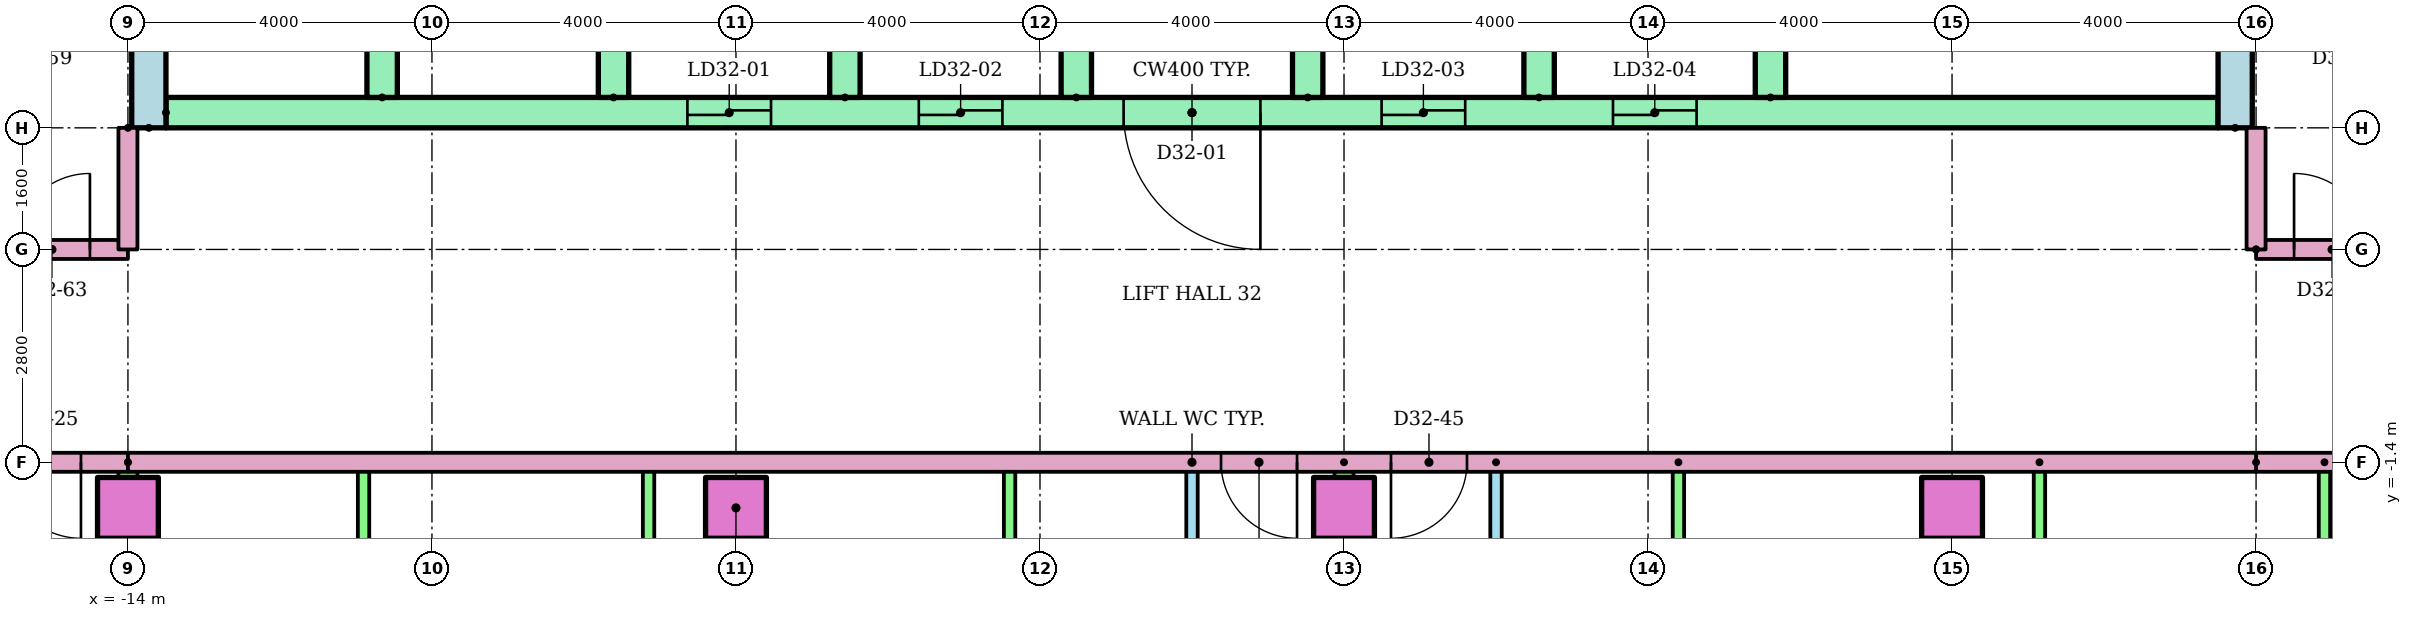
"""IFC4 building model, lengths in metres.
Left out: names, types, materials, properties, quantities, classifications, styles, units other than length and angle.
Written with IfcOpenShell. Run it as: python <this file> out.ifc"""

import sys

from ifc_helpers import new_model, si_unit, direction, frame, frame_2d, origin, origin_2d, place, context, subcontext, project, spatial, rectangle, extrude, element, fill, save


model = new_model("IFC4")
c1 = context("Model", 3, precision=1e-05, world=origin(), true_north=direction((0.0, 1.0)))
c2 = subcontext(c1, "Body", "Model", "MODEL_VIEW")
j1 = project(units=[si_unit("LENGTHUNIT", "METRE"), si_unit("PLANEANGLEUNIT", "RADIAN")], contexts=[c1])
p1 = place(None, origin())
s1 = spatial("IfcSite", under=j1, at=p1, CompositionType="ELEMENT")
p2 = place(p1, origin())
s2 = spatial("IfcBuilding", under=s1, at=p2, CompositionType="ELEMENT")
p3 = place(p2, frame((0.0, 0.0, 126.2)))
s3 = spatial("IfcBuildingStorey", under=s2, at=p3, CompositionType="ELEMENT", Elevation=126.2)
for number, where in (
    (1, (-14.0, -2.0, 0.0)),
    (2, (-6.0, -2.0, 0.0)),
    (3, (2.0, -2.0, 0.0)),
    (4, (10.0, -2.0, 0.0)),
):
    element("IfcColumn", number, at=place(p3, frame(where)), inside=s3, PredefinedType="COLUMN", context=c2, shape_type="SweptSolid", body=[
        extrude(rectangle(XDim=0.8, YDim=0.8, at=origin_2d()), origin(), (0.0, 0.0, 1.0), 3.2),
    ])
for number, where, z_axis, x_axis in (
    (5, (-13.725, 3.0, 0.0), (0.0, 0.0, 1.0), (0.0, 1.0, 0.0)),
    (6, (13.725, 3.0, 0.0), (0.0, 0.0, 1.0), (0.0, 1.0, 0.0)),
):
    element("IfcWall", number, at=place(p3, frame(where, z_axis=z_axis, x_axis=x_axis)), inside=s3, PredefinedType="SHEAR", context=c2, shape_type="SweptSolid", body=[
        extrude(rectangle(XDim=17.0, YDim=0.45, at=frame_2d((8.5, 0.0))), origin(), (0.0, 0.0, 1.0), 2.92),
    ])
p4 = place(p3, frame((-13.5, 3.2, 0.0)))
e7 = element("IfcWall", 7, at=p4, inside=s3, PredefinedType="SHEAR", context=c2, shape_type="SweptSolid", body=[
    extrude(rectangle(XDim=27.0, YDim=0.4, at=frame_2d((13.5, 0.0))), origin(), (0.0, 0.0, 1.0), 2.92),
])
p5 = place(p4, frame((6.861, 0.0, 0.0)))
e8 = element("IfcOpeningElement", 8, at=p5, cuts=e7, PredefinedType="OPENING", context=c2, shape_type="SweptSolid", body=[
    extrude(rectangle(XDim=1.1, YDim=2.1, at=frame_2d((0.55, 1.05))), frame((0.0, 0.21, 0.0), z_axis=(0.0, -1.0, 0.0), x_axis=(1.0, 0.0, 0.0)), (0.0, 0.0, 1.0), 0.42),
])
p6 = place(p4, frame((9.906, 0.0, 0.0)))
e9 = element("IfcOpeningElement", 9, at=p6, cuts=e7, PredefinedType="OPENING", context=c2, shape_type="SweptSolid", body=[
    extrude(rectangle(XDim=1.1, YDim=2.1, at=frame_2d((0.55, 1.05))), frame((0.0, 0.21, 0.0), z_axis=(0.0, -1.0, 0.0), x_axis=(1.0, 0.0, 0.0)), (0.0, 0.0, 1.0), 0.42),
])
p7 = place(p4, frame((15.994, 0.0, 0.0)))
e10 = element("IfcOpeningElement", 10, at=p7, cuts=e7, PredefinedType="OPENING", context=c2, shape_type="SweptSolid", body=[
    extrude(rectangle(XDim=1.1, YDim=2.1, at=frame_2d((0.55, 1.05))), frame((0.0, 0.21, 0.0), z_axis=(0.0, -1.0, 0.0), x_axis=(1.0, 0.0, 0.0)), (0.0, 0.0, 1.0), 0.42),
])
p8 = place(p4, frame((19.039, 0.0, 0.0)))
e11 = element("IfcOpeningElement", 11, at=p8, cuts=e7, PredefinedType="OPENING", context=c2, shape_type="SweptSolid", body=[
    extrude(rectangle(XDim=1.1, YDim=2.1, at=frame_2d((0.55, 1.05))), frame((0.0, 0.21, 0.0), z_axis=(0.0, -1.0, 0.0), x_axis=(1.0, 0.0, 0.0)), (0.0, 0.0, 1.0), 0.42),
])
p9 = place(p4, frame((12.6, 0.0, 0.0)))
e12 = element("IfcOpeningElement", 12, at=p9, cuts=e7, PredefinedType="OPENING", context=c2, shape_type="SweptSolid", body=[
    extrude(rectangle(XDim=1.8, YDim=2.1, at=frame_2d((0.9, 1.05))), frame((0.0, 0.21, 0.0), z_axis=(0.0, -1.0, 0.0), x_axis=(1.0, 0.0, 0.0)), (0.0, 0.0, 1.0), 0.42),
])
for number, where, z_axis, x_axis in (
    (13, (-10.656, 3.4, 0.0), (0.0, 0.0, 1.0), (0.0, 1.0, 0.0)),
    (14, (-7.611, 3.4, 0.0), (0.0, 0.0, 1.0), (0.0, 1.0, 0.0)),
    (15, (-4.567, 3.4, 0.0), (0.0, 0.0, 1.0), (0.0, 1.0, 0.0)),
    (16, (-1.522, 3.4, 0.0), (0.0, 0.0, 1.0), (0.0, 1.0, 0.0)),
    (17, (1.522, 3.4, 0.0), (0.0, 0.0, 1.0), (0.0, 1.0, 0.0)),
    (18, (4.567, 3.4, 0.0), (0.0, 0.0, 1.0), (0.0, 1.0, 0.0)),
    (19, (7.611, 3.4, 0.0), (0.0, 0.0, 1.0), (0.0, 1.0, 0.0)),
):
    element("IfcWall", number, at=place(p3, frame(where, z_axis=z_axis, x_axis=x_axis)), inside=s3, PredefinedType="SHEAR", context=c2, shape_type="SweptSolid", body=[
        extrude(rectangle(XDim=3.0, YDim=0.4, at=frame_2d((1.5, 0.0))), origin(), (0.0, 0.0, 1.0), 2.92),
    ])
p10 = place(p3, frame((0.0, -8.0, 0.0), z_axis=(0.0, 0.0, 1.0), x_axis=(0.0, 1.0, 0.0)))
e20 = element("IfcWall", 20, at=p10, inside=s3, PredefinedType="PARTITIONING", context=c2, shape_type="SweptSolid", body=[
    extrude(rectangle(XDim=6.6, YDim=0.15, at=frame_2d((3.3, 0.0))), origin(), (0.0, 0.0, 1.0), 2.4),
])
p11 = place(p10, frame((4.275, 0.0, 0.0)))
e21 = element("IfcOpeningElement", 21, at=p11, cuts=e20, PredefinedType="OPENING", context=c2, shape_type="SweptSolid", body=[
    extrude(rectangle(XDim=0.9, YDim=2.1, at=frame_2d((0.45, 1.05))), frame((0.0, 0.085, 0.0), z_axis=(0.0, -1.0, 0.0), x_axis=(1.0, 0.0, 0.0)), (0.0, 0.0, 1.0), 0.17),
])
p12 = place(p10, frame((1.025, 0.0, 0.0)))
e22 = element("IfcOpeningElement", 22, at=p12, cuts=e20, PredefinedType="OPENING", context=c2, shape_type="SweptSolid", body=[
    extrude(rectangle(XDim=0.8, YDim=2.1, at=frame_2d((0.4, 1.05))), frame((0.0, 0.085, 0.0), z_axis=(0.0, -1.0, 0.0), x_axis=(1.0, 0.0, 0.0)), (0.0, 0.0, 1.0), 0.17),
])
for number, where, z_axis, x_axis in (
    (23, (-2.4, -8.0, 0.0), (0.0, 0.0, 1.0), (0.0, 1.0, 0.0)),
    (24, (-7.15, -8.0, 0.0), (0.0, 0.0, 1.0), (0.0, 1.0, 0.0)),
    (25, (-10.9, -8.0, 0.0), (0.0, 0.0, 1.0), (0.0, 1.0, 0.0)),
):
    element("IfcWall", number, at=place(p3, frame(where, z_axis=z_axis, x_axis=x_axis)), inside=s3, PredefinedType="PARTITIONING", context=c2, shape_type="SweptSolid", body=[
        extrude(rectangle(XDim=6.6, YDim=0.15, at=frame_2d((3.3, 0.0))), origin(), (0.0, 0.0, 1.0), 2.4),
    ])
p13 = place(p3, frame((-14.0, -1.4, 0.0), z_axis=(0.0, 0.0, 1.0), x_axis=(0.0, -1.0, 0.0)))
e26 = element("IfcWall", 26, at=p13, inside=s3, PredefinedType="PARTITIONING", context=c2, shape_type="SweptSolid", body=[
    extrude(rectangle(XDim=14.91, YDim=0.25, at=frame_2d((7.455, 0.0))), origin(), (0.0, 0.0, 1.0), 2.4),
])
p14 = place(p3, frame((4.0, -1.4, 0.0), z_axis=(0.0, 0.0, 1.0), x_axis=(0.0, -1.0, 0.0)))
e27 = element("IfcWall", 27, at=p14, inside=s3, PredefinedType="PARTITIONING", context=c2, shape_type="SweptSolid", body=[
    extrude(rectangle(XDim=6.6, YDim=0.15, at=frame_2d((3.3, 0.0))), origin(), (0.0, 0.0, 1.0), 2.4),
])
p15 = place(p14, frame((1.425, 0.0, 0.0)))
e28 = element("IfcOpeningElement", 28, at=p15, cuts=e27, PredefinedType="OPENING", context=c2, shape_type="SweptSolid", body=[
    extrude(rectangle(XDim=0.9, YDim=2.1, at=frame_2d((0.45, 1.05))), frame((0.0, 0.085, 0.0), z_axis=(0.0, -1.0, 0.0), x_axis=(1.0, 0.0, 0.0)), (0.0, 0.0, 1.0), 0.17),
])
p16 = place(p14, frame((4.775, 0.0, 0.0)))
e29 = element("IfcOpeningElement", 29, at=p16, cuts=e27, PredefinedType="OPENING", context=c2, shape_type="SweptSolid", body=[
    extrude(rectangle(XDim=0.8, YDim=2.1, at=frame_2d((0.4, 1.05))), frame((0.0, 0.085, 0.0), z_axis=(0.0, -1.0, 0.0), x_axis=(1.0, 0.0, 0.0)), (0.0, 0.0, 1.0), 0.17),
])
for number, where, z_axis, x_axis in (
    (30, (6.4, -1.4, 0.0), (0.0, 0.0, 1.0), (0.0, -1.0, 0.0)),
    (31, (11.15, -1.4, 0.0), (0.0, 0.0, 1.0), (0.0, -1.0, 0.0)),
    (32, (14.9, -1.4, 0.0), (0.0, 0.0, 1.0), (0.0, -1.0, 0.0)),
):
    element("IfcWall", number, at=place(p3, frame(where, z_axis=z_axis, x_axis=x_axis)), inside=s3, PredefinedType="PARTITIONING", context=c2, shape_type="SweptSolid", body=[
        extrude(rectangle(XDim=6.6, YDim=0.15, at=frame_2d((3.3, 0.0))), origin(), (0.0, 0.0, 1.0), 2.4),
    ])
p17 = place(p3, frame((2.0, -1.4, 0.0), z_axis=(0.0, 0.0, 1.0), x_axis=(0.0, -1.0, 0.0)))
e33 = element("IfcWall", 33, at=p17, inside=s3, PredefinedType="PARTITIONING", context=c2, shape_type="SweptSolid", body=[
    extrude(rectangle(XDim=14.91, YDim=0.25, at=frame_2d((7.455, 0.0))), origin(), (0.0, 0.0, 1.0), 2.4),
])
p18 = place(p3, frame((-14.0, -1.4, 0.0), z_axis=(0.0, 0.0, 1.0), x_axis=(-1.0, 0.0, 0.0)))
e34 = element("IfcWall", 34, at=p18, inside=s3, PredefinedType="PARTITIONING", context=c2, shape_type="SweptSolid", body=[
    extrude(rectangle(XDim=15.0, YDim=0.25, at=frame_2d((7.5, 0.0))), origin(), (0.0, 0.0, 1.0), 2.4),
])
p19 = place(p18, frame((8.618, 0.0, 0.0)))
e35 = element("IfcOpeningElement", 35, at=p19, cuts=e34, PredefinedType="OPENING", context=c2, shape_type="SweptSolid", body=[
    extrude(rectangle(XDim=1.0, YDim=2.1, at=frame_2d((0.5, 1.05))), frame((0.0, 0.135, 0.0), z_axis=(0.0, -1.0, 0.0), x_axis=(1.0, 0.0, 0.0)), (0.0, 0.0, 1.0), 0.27),
])
p20 = place(p18, frame((0.618, 0.0, 0.0)))
e36 = element("IfcOpeningElement", 36, at=p20, cuts=e34, PredefinedType="OPENING", context=c2, shape_type="SweptSolid", body=[
    extrude(rectangle(XDim=1.0, YDim=2.1, at=frame_2d((0.5, 1.05))), frame((0.0, 0.135, 0.0), z_axis=(0.0, -1.0, 0.0), x_axis=(1.0, 0.0, 0.0)), (0.0, 0.0, 1.0), 0.27),
])
p21 = place(p3, frame((29.0, -1.4, 0.0), z_axis=(0.0, 0.0, 1.0), x_axis=(-1.0, 0.0, 0.0)))
e37 = element("IfcWall", 37, at=p21, inside=s3, PredefinedType="PARTITIONING", context=c2, shape_type="SweptSolid", body=[
    extrude(rectangle(XDim=15.0, YDim=0.25, at=frame_2d((7.5, 0.0))), origin(), (0.0, 0.0, 1.0), 2.4),
])
p22 = place(p21, frame((9.382, 0.0, 0.0)))
e38 = element("IfcOpeningElement", 38, at=p22, cuts=e37, PredefinedType="OPENING", context=c2, shape_type="SweptSolid", body=[
    extrude(rectangle(XDim=1.0, YDim=2.1, at=frame_2d((0.5, 1.05))), frame((0.0, 0.135, 0.0), z_axis=(0.0, -1.0, 0.0), x_axis=(1.0, 0.0, 0.0)), (0.0, 0.0, 1.0), 0.27),
])
p23 = place(p3, frame((-29.0, 1.4, 0.0)))
e39 = element("IfcWall", 39, at=p23, inside=s3, PredefinedType="PARTITIONING", context=c2, shape_type="SweptSolid", body=[
    extrude(rectangle(XDim=15.0, YDim=0.25, at=frame_2d((7.5, 0.0))), origin(), (0.0, 0.0, 1.0), 2.4),
])
p24 = place(p23, frame((5.382, 0.0, 0.0)))
e40 = element("IfcOpeningElement", 40, at=p24, cuts=e39, PredefinedType="OPENING", context=c2, shape_type="SweptSolid", body=[
    extrude(rectangle(XDim=1.0, YDim=2.1, at=frame_2d((0.5, 1.05))), frame((0.0, 0.135, 0.0), z_axis=(0.0, -1.0, 0.0), x_axis=(1.0, 0.0, 0.0)), (0.0, 0.0, 1.0), 0.27),
])
p25 = place(p23, frame((13.5, 0.0, 0.0)))
e41 = element("IfcOpeningElement", 41, at=p25, cuts=e39, PredefinedType="OPENING", context=c2, shape_type="SweptSolid", body=[
    extrude(rectangle(XDim=1.0, YDim=2.1, at=frame_2d((0.5, 1.05))), frame((0.0, 0.135, 0.0), z_axis=(0.0, -1.0, 0.0), x_axis=(1.0, 0.0, 0.0)), (0.0, 0.0, 1.0), 0.27),
])
p26 = place(p3, frame((14.0, 1.4, 0.0)))
e42 = element("IfcWall", 42, at=p26, inside=s3, PredefinedType="PARTITIONING", context=c2, shape_type="SweptSolid", body=[
    extrude(rectangle(XDim=15.0, YDim=0.25, at=frame_2d((7.5, 0.0))), origin(), (0.0, 0.0, 1.0), 2.4),
])
p27 = place(p26, frame((0.5, 0.0, 0.0)))
e43 = element("IfcOpeningElement", 43, at=p27, cuts=e42, PredefinedType="OPENING", context=c2, shape_type="SweptSolid", body=[
    extrude(rectangle(XDim=1.0, YDim=2.1, at=frame_2d((0.5, 1.05))), frame((0.0, 0.135, 0.0), z_axis=(0.0, -1.0, 0.0), x_axis=(1.0, 0.0, 0.0)), (0.0, 0.0, 1.0), 0.27),
])
p28 = place(p3, frame((14.0, -1.4, 0.0), z_axis=(0.0, 0.0, 1.0), x_axis=(-1.0, 0.0, 0.0)))
e44 = element("IfcWall", 44, at=p28, inside=s3, PredefinedType="PARTITIONING", context=c2, shape_type="SweptSolid", body=[
    extrude(rectangle(XDim=28.0, YDim=0.25, at=frame_2d((14.0, 0.0))), origin(), (0.0, 0.0, 1.0), 2.4),
])
p29 = place(p28, frame((12.618, 0.0, 0.0)))
e45 = element("IfcOpeningElement", 45, at=p29, cuts=e44, PredefinedType="OPENING", context=c2, shape_type="SweptSolid", body=[
    extrude(rectangle(XDim=1.0, YDim=2.1, at=frame_2d((0.5, 1.05))), frame((0.0, 0.135, 0.0), z_axis=(0.0, -1.0, 0.0), x_axis=(1.0, 0.0, 0.0)), (0.0, 0.0, 1.0), 0.27),
])
p30 = place(p28, frame((10.382, 0.0, 0.0)))
e46 = element("IfcOpeningElement", 46, at=p30, cuts=e44, PredefinedType="OPENING", context=c2, shape_type="SweptSolid", body=[
    extrude(rectangle(XDim=1.0, YDim=2.1, at=frame_2d((0.5, 1.05))), frame((0.0, 0.135, 0.0), z_axis=(0.0, -1.0, 0.0), x_axis=(1.0, 0.0, 0.0)), (0.0, 0.0, 1.0), 0.27),
])
for number, where, z_axis, x_axis in (
    (47, (-14.0, 3.0, 0.0), (0.0, 0.0, 1.0), (0.0, -1.0, 0.0)),
    (48, (14.0, 1.4, 0.0), (0.0, 0.0, 1.0), (0.0, 1.0, 0.0)),
):
    element("IfcWall", number, at=place(p3, frame(where, z_axis=z_axis, x_axis=x_axis)), inside=s3, PredefinedType="PARTITIONING", context=c2, shape_type="SweptSolid", body=[
        extrude(rectangle(XDim=1.6, YDim=0.25, at=frame_2d((0.8, 0.0))), origin(), (0.0, 0.0, 1.0), 2.4),
    ])
p31 = place(p5, origin())
e49 = element("IfcDoor", 49, at=p31, inside=s3, OperationType="SLIDING_TO_LEFT", PredefinedType="DOOR", context=c2, shape_type="SweptSolid", body=[
    extrude(rectangle(XDim=1.1, YDim=2.1, at=frame_2d((0.55, 1.05))), frame((0.0, 0.025, 0.0), z_axis=(0.0, -1.0, 0.0), x_axis=(1.0, 0.0, 0.0)), (0.0, 0.0, 1.0), 0.05),
])
fill(e8, e49)
p32 = place(p6, origin())
e50 = element("IfcDoor", 50, at=p32, inside=s3, OperationType="SLIDING_TO_LEFT", PredefinedType="DOOR", context=c2, shape_type="SweptSolid", body=[
    extrude(rectangle(XDim=1.1, YDim=2.1, at=frame_2d((0.55, 1.05))), frame((0.0, 0.025, 0.0), z_axis=(0.0, -1.0, 0.0), x_axis=(1.0, 0.0, 0.0)), (0.0, 0.0, 1.0), 0.05),
])
fill(e9, e50)
p33 = place(p7, origin())
e51 = element("IfcDoor", 51, at=p33, inside=s3, OperationType="SLIDING_TO_LEFT", PredefinedType="DOOR", context=c2, shape_type="SweptSolid", body=[
    extrude(rectangle(XDim=1.1, YDim=2.1, at=frame_2d((0.55, 1.05))), frame((0.0, 0.025, 0.0), z_axis=(0.0, -1.0, 0.0), x_axis=(1.0, 0.0, 0.0)), (0.0, 0.0, 1.0), 0.05),
])
fill(e10, e51)
p34 = place(p8, origin())
e52 = element("IfcDoor", 52, at=p34, inside=s3, OperationType="SLIDING_TO_LEFT", PredefinedType="DOOR", context=c2, shape_type="SweptSolid", body=[
    extrude(rectangle(XDim=1.1, YDim=2.1, at=frame_2d((0.55, 1.05))), frame((0.0, 0.025, 0.0), z_axis=(0.0, -1.0, 0.0), x_axis=(1.0, 0.0, 0.0)), (0.0, 0.0, 1.0), 0.05),
])
fill(e11, e52)
p35 = place(p9, frame((1.8, 0.0, 0.0), z_axis=(0.0, 0.0, 1.0), x_axis=(-1.0, 0.0, 0.0)))
e53 = element("IfcDoor", 53, at=p35, inside=s3, OperationType="DOUBLE_DOOR_SINGLE_SWING", PredefinedType="DOOR", context=c2, shape_type="SweptSolid", body=[
    extrude(rectangle(XDim=1.8, YDim=2.1, at=frame_2d((0.9, 1.05))), frame((0.0, 0.025, 0.0), z_axis=(0.0, -1.0, 0.0), x_axis=(1.0, 0.0, 0.0)), (0.0, 0.0, 1.0), 0.05),
])
fill(e12, e53)
p36 = place(p20, origin())
e54 = element("IfcDoor", 54, at=p36, inside=s3, OperationType="SINGLE_SWING_LEFT", PredefinedType="DOOR", context=c2, shape_type="SweptSolid", body=[
    extrude(rectangle(XDim=1.0, YDim=2.1, at=frame_2d((0.5, 1.05))), frame((0.0, 0.025, 0.0), z_axis=(0.0, -1.0, 0.0), x_axis=(1.0, 0.0, 0.0)), (0.0, 0.0, 1.0), 0.05),
])
fill(e36, e54)
p37 = place(p29, origin())
e55 = element("IfcDoor", 55, at=p37, inside=s3, OperationType="SINGLE_SWING_LEFT", PredefinedType="DOOR", context=c2, shape_type="SweptSolid", body=[
    extrude(rectangle(XDim=1.0, YDim=2.1, at=frame_2d((0.5, 1.05))), frame((0.0, 0.025, 0.0), z_axis=(0.0, -1.0, 0.0), x_axis=(1.0, 0.0, 0.0)), (0.0, 0.0, 1.0), 0.05),
])
fill(e45, e55)
p38 = place(p30, origin())
e56 = element("IfcDoor", 56, at=p38, inside=s3, OperationType="SINGLE_SWING_RIGHT", PredefinedType="DOOR", context=c2, shape_type="SweptSolid", body=[
    extrude(rectangle(XDim=1.0, YDim=2.1, at=frame_2d((0.5, 1.05))), frame((0.0, 0.025, 0.0), z_axis=(0.0, -1.0, 0.0), x_axis=(1.0, 0.0, 0.0)), (0.0, 0.0, 1.0), 0.05),
])
fill(e46, e56)
p39 = place(p25, origin())
e57 = element("IfcDoor", 57, at=p39, inside=s3, OperationType="SINGLE_SWING_RIGHT", PredefinedType="DOOR", context=c2, shape_type="SweptSolid", body=[
    extrude(rectangle(XDim=1.0, YDim=2.1, at=frame_2d((0.5, 1.05))), frame((0.0, 0.025, 0.0), z_axis=(0.0, -1.0, 0.0), x_axis=(1.0, 0.0, 0.0)), (0.0, 0.0, 1.0), 0.05),
])
fill(e41, e57)
p40 = place(p27, origin())
e58 = element("IfcDoor", 58, at=p40, inside=s3, OperationType="SINGLE_SWING_LEFT", PredefinedType="DOOR", context=c2, shape_type="SweptSolid", body=[
    extrude(rectangle(XDim=1.0, YDim=2.1, at=frame_2d((0.5, 1.05))), frame((0.0, 0.025, 0.0), z_axis=(0.0, -1.0, 0.0), x_axis=(1.0, 0.0, 0.0)), (0.0, 0.0, 1.0), 0.05),
])
fill(e43, e58)
save(model, sys.argv[1])
